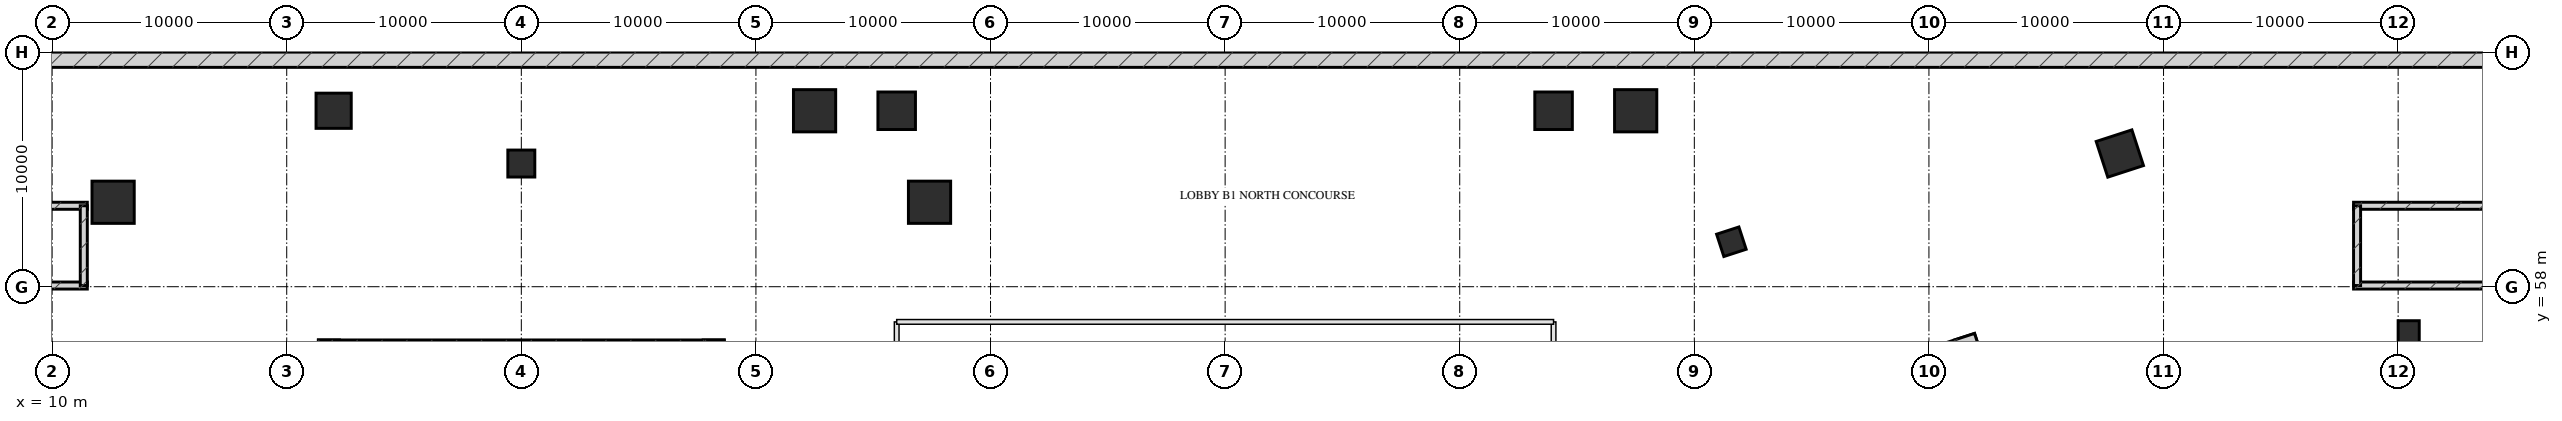
"""IFC4 building model, lengths in metres.
Left out: names, types, materials, properties, quantities, classifications, styles, units other than length and angle.
Written with IfcOpenShell. Run it as: python <this file> out.ifc"""

import sys

from ifc_helpers import new_model, si_unit, direction, frame, frame_2d, origin, origin_2d, place, context, subcontext, project, spatial, rectangle, hollow_rectangle, extrude, element, save


model = new_model("IFC4")
c1 = context("Model", 3, precision=1e-05, world=origin(), true_north=direction((0.0, 1.0)))
c2 = subcontext(c1, "Body", "Model", "MODEL_VIEW")
j1 = project(units=[si_unit("LENGTHUNIT", "METRE"), si_unit("PLANEANGLEUNIT", "RADIAN")], contexts=[c1])
p1 = place(None, origin())
s1 = spatial("IfcSite", under=j1, at=p1, CompositionType="ELEMENT")
p2 = place(p1, origin())
s2 = spatial("IfcBuilding", under=s1, at=p2, CompositionType="ELEMENT")
p3 = place(p2, frame((0.0, 0.0, -6.0)))
s3 = spatial("IfcBuildingStorey", under=s2, at=p3, CompositionType="ELEMENT", Elevation=-6.0)
p4 = place(p3, frame((21.35, 55.28, 0.0), z_axis=(0.0, 0.0, 1.0), x_axis=(1.0, 0.0, 0.0)))
e1 = element("IfcWall", 1, at=p4, inside=s3, PredefinedType="SHEAR", context=c2, shape_type="SweptSolid", body=[
    extrude(rectangle(XDim=17.3, YDim=0.9, at=frame_2d((8.65, 0.0))), origin(), (0.0, 0.0, 1.0), 6.0),
])
for number, where, z_axis, x_axis in (
    (2, (21.8, 45.95, 0.0), (0.0, 0.0, 1.0), (0.0, 1.0, 0.0)),
    (3, (38.2, 45.95, 0.0), (0.0, 0.0, 1.0), (0.0, 1.0, 0.0)),
):
    element("IfcWall", number, at=place(p3, frame(where, z_axis=z_axis, x_axis=x_axis)), inside=s3, PredefinedType="SHEAR", context=c2, shape_type="SweptSolid", body=[
        extrude(rectangle(XDim=9.78, YDim=0.9, at=frame_2d((4.89, 0.0))), origin(), (0.0, 0.0, 1.0), 6.0),
    ])
p5 = place(p3, frame((76.201, 50.419, 0.0), z_axis=(0.0, 0.0, 1.0), x_axis=(0.951056412142, 0.309017314926, 0.0)))
e4 = element("IfcWall", 4, at=p5, inside=s3, PredefinedType="SHEAR", context=c2, shape_type="SweptSolid", body=[
    extrude(rectangle(XDim=16.7, YDim=0.9, at=frame_2d((8.35, 0.0))), origin(), (0.0, 0.0, 1.0), 6.0),
])
p6 = place(p3, frame((94.539, 46.568, 0.0), z_axis=(0.0, 0.0, 1.0), x_axis=(-0.309021722829, 0.951054979914, 0.0)))
e5 = element("IfcWall", 5, at=p6, inside=s3, PredefinedType="SHEAR", context=c2, shape_type="SweptSolid", body=[
    extrude(rectangle(XDim=9.78, YDim=0.9, at=frame_2d((4.89, 0.0))), origin(), (0.0, 0.0, 1.0), 6.0),
])
for number, where, z_axis, x_axis in (
    (6, (2.6, 58.05, 0.0), (0.0, 0.0, 1.0), (1.0, 0.0, 0.0)),
    (7, (2.6, 61.45, 0.0), (0.0, 0.0, 1.0), (1.0, 0.0, 0.0)),
):
    element("IfcWall", number, at=place(p3, frame(where, z_axis=z_axis, x_axis=x_axis)), inside=s3, PredefinedType="SHEAR", context=c2, shape_type="SweptSolid", body=[
        extrude(rectangle(XDim=8.9, YDim=0.3, at=frame_2d((4.45, 0.0))), origin(), (0.0, 0.0, 1.0), 6.0),
    ])
p7 = place(p3, frame((11.35, 58.05, 0.0), z_axis=(0.0, 0.0, 1.0), x_axis=(0.0, 1.0, 0.0)))
e8 = element("IfcWall", 8, at=p7, inside=s3, PredefinedType="SHEAR", context=c2, shape_type="SweptSolid", body=[
    extrude(rectangle(XDim=3.4, YDim=0.3, at=frame_2d((1.7, 0.0))), origin(), (0.0, 0.0, 1.0), 6.0),
])
for number, where, z_axis, x_axis in (
    (9, (108.1, 58.05, 0.0), (0.0, 0.0, 1.0), (1.0, 0.0, 0.0)),
    (10, (108.1, 61.45, 0.0), (0.0, 0.0, 1.0), (1.0, 0.0, 0.0)),
):
    element("IfcWall", number, at=place(p3, frame(where, z_axis=z_axis, x_axis=x_axis)), inside=s3, PredefinedType="SHEAR", context=c2, shape_type="SweptSolid", body=[
        extrude(rectangle(XDim=8.9, YDim=0.3, at=frame_2d((4.45, 0.0))), origin(), (0.0, 0.0, 1.0), 6.0),
    ])
p8 = place(p3, frame((108.25, 58.05, 0.0), z_axis=(0.0, 0.0, 1.0), x_axis=(0.0, 1.0, 0.0)))
e11 = element("IfcWall", 11, at=p8, inside=s3, PredefinedType="SHEAR", context=c2, shape_type="SweptSolid", body=[
    extrude(rectangle(XDim=3.4, YDim=0.3, at=frame_2d((1.7, 0.0))), origin(), (0.0, 0.0, 1.0), 6.0),
])
p9 = place(p3, frame((0.325, 67.675, 0.0), z_axis=(0.0, 0.0, 1.0), x_axis=(1.0, 0.0, 0.0)))
e12 = element("IfcWall", 12, at=p9, inside=s3, PredefinedType="SHEAR", context=c2, shape_type="SweptSolid", body=[
    extrude(rectangle(XDim=119.35, YDim=0.65, at=frame_2d((59.675, 0.0))), origin(), (0.0, 0.0, 1.0), 6.0),
])
p10 = place(p3, frame((110.45, 56.0, 0.0), z_axis=(0.0, 0.0, 1.0), x_axis=(1.0, 0.0, 0.0)))
e13 = element("IfcColumn", 13, at=p10, inside=s3, PredefinedType="COLUMN", context=c2, shape_type="SweptSolid", body=[
    extrude(rectangle(XDim=0.9, YDim=1.1, at=origin_2d()), origin(), (0.0, 0.0, 1.0), 5.65),
])
p11 = place(p3, frame((22.0, 65.5, 0.0), z_axis=(0.0, 0.0, 1.0), x_axis=(1.0, 0.0, 0.0)))
e14 = element("IfcColumn", 14, at=p11, inside=s3, PredefinedType="COLUMN", context=c2, shape_type="SweptSolid", body=[
    extrude(rectangle(XDim=1.5, YDim=1.5, at=origin_2d()), origin(), (0.0, 0.0, 1.0), 6.001),
])
for number, where, z_axis, x_axis in (
    (15, (42.5, 65.5, 0.0), (0.0, 0.0, 1.0), (1.0, 0.0, 0.0)),
    (16, (77.5, 65.5, 0.0), (0.0, 0.0, 1.0), (1.0, 0.0, 0.0)),
):
    element("IfcColumn", number, at=place(p3, frame(where, z_axis=z_axis, x_axis=x_axis)), inside=s3, PredefinedType="COLUMN", context=c2, shape_type="SweptSolid", body=[
        extrude(hollow_rectangle(XDim=1.8, YDim=1.8, WallThickness=0.06, at=origin_2d()), origin(), (0.0, 0.0, 1.0), 6.001),
    ])
for number, where, z_axis, x_axis in (
    (17, (46.0, 65.5, 0.0), (0.0, 0.0, 1.0), (1.0, 0.0, 0.0)),
    (18, (74.0, 65.5, 0.0), (0.0, 0.0, 1.0), (1.0, 0.0, 0.0)),
):
    element("IfcColumn", number, at=place(p3, frame(where, z_axis=z_axis, x_axis=x_axis)), inside=s3, PredefinedType="COLUMN", context=c2, shape_type="SweptSolid", body=[
        extrude(hollow_rectangle(XDim=1.6, YDim=1.6, WallThickness=0.055, at=origin_2d()), origin(), (0.0, 0.0, 1.0), 6.001),
    ])
for number, where, z_axis, x_axis in (
    (19, (47.4, 61.6, 0.0), (0.0, 0.0, 1.0), (1.0, 0.0, 0.0)),
    (20, (12.6, 61.6, 0.0), (0.0, 0.0, 1.0), (1.0, 0.0, 0.0)),
):
    element("IfcColumn", number, at=place(p3, frame(where, z_axis=z_axis, x_axis=x_axis)), inside=s3, PredefinedType="COLUMN", context=c2, shape_type="SweptSolid", body=[
        extrude(hollow_rectangle(XDim=1.8, YDim=1.8, WallThickness=0.06, at=origin_2d()), origin(), (0.0, 0.0, 1.0), 6.001),
    ])
p12 = place(p3, frame((30.0, 63.25, 0.0), z_axis=(0.0, 0.0, 1.0), x_axis=(1.0, 0.0, 0.0)))
e21 = element("IfcColumn", 21, at=p12, inside=s3, PredefinedType="COLUMN", context=c2, shape_type="SweptSolid", body=[
    extrude(hollow_rectangle(XDim=1.15, YDim=1.15, WallThickness=0.04, at=origin_2d()), origin(), (0.0, 0.0, 1.0), 6.001),
])
p13 = place(p3, frame((98.137, 63.677, 0.0), z_axis=(0.0, 0.0, 1.0), x_axis=(0.951056516295, 0.309016994375, 0.0)))
e22 = element("IfcColumn", 22, at=p13, inside=s3, PredefinedType="COLUMN", context=c2, shape_type="SweptSolid", body=[
    extrude(hollow_rectangle(XDim=1.6, YDim=1.6, WallThickness=0.055, at=origin_2d()), origin(), (0.0, 0.0, 1.0), 6.001),
])
p14 = place(p3, frame((81.579, 59.916, 0.0), z_axis=(0.0, 0.0, 1.0), x_axis=(0.951056516295, 0.309016994375, 0.0)))
e23 = element("IfcColumn", 23, at=p14, inside=s3, PredefinedType="COLUMN", context=c2, shape_type="SweptSolid", body=[
    extrude(hollow_rectangle(XDim=1.0, YDim=1.0, WallThickness=0.036, at=origin_2d()), origin(), (0.0, 0.0, 1.0), 6.001),
])
p15 = place(p3, frame((46.0, 11.5, 0.0), z_axis=(0.0, 0.0, 1.0), x_axis=(0.0, 1.0, 0.0)))
e24 = element("IfcWall", 24, at=p15, inside=s3, PredefinedType="PARTITIONING", context=c2, shape_type="SweptSolid", body=[
    extrude(rectangle(XDim=45.0, YDim=0.2, at=frame_2d((22.5, 0.0))), origin(), (0.0, 0.0, 1.0), 5.685),
])
p16 = place(p15, frame((18.0, 0.0, 0.0)))
e25 = element("IfcOpeningElement", 25, at=p16, cuts=e24, PredefinedType="OPENING", context=c2, shape_type="SweptSolid", body=[
    extrude(rectangle(XDim=1.8, YDim=2.05, at=frame_2d((0.9, 1.025))), frame((0.0, 0.11, 0.0), z_axis=(0.0, -1.0, 0.0), x_axis=(1.0, 0.0, 0.0)), (0.0, 0.0, 1.0), 0.22),
])
p17 = place(p3, frame((74.0, 11.5, 0.0), z_axis=(0.0, 0.0, 1.0), x_axis=(0.0, 1.0, 0.0)))
e26 = element("IfcWall", 26, at=p17, inside=s3, PredefinedType="PARTITIONING", context=c2, shape_type="SweptSolid", body=[
    extrude(rectangle(XDim=45.0, YDim=0.2, at=frame_2d((22.5, 0.0))), origin(), (0.0, 0.0, 1.0), 5.685),
])
p18 = place(p17, frame((18.0, 0.0, 0.0)))
e27 = element("IfcOpeningElement", 27, at=p18, cuts=e26, PredefinedType="OPENING", context=c2, shape_type="SweptSolid", body=[
    extrude(rectangle(XDim=1.8, YDim=2.05, at=frame_2d((0.9, 1.025))), frame((0.0, 0.11, 0.0), z_axis=(0.0, -1.0, 0.0), x_axis=(1.0, 0.0, 0.0)), (0.0, 0.0, 1.0), 0.22),
])
p19 = place(p3, frame((46.0, 56.5, 0.0), z_axis=(0.0, 0.0, 1.0), x_axis=(1.0, 0.0, 0.0)))
e28 = element("IfcWall", 28, at=p19, inside=s3, PredefinedType="PARTITIONING", context=c2, shape_type="SweptSolid", body=[
    extrude(rectangle(XDim=28.0, YDim=0.2, at=frame_2d((14.0, 0.0))), origin(), (0.0, 0.0, 1.0), 5.685),
])
save(model, sys.argv[1])
